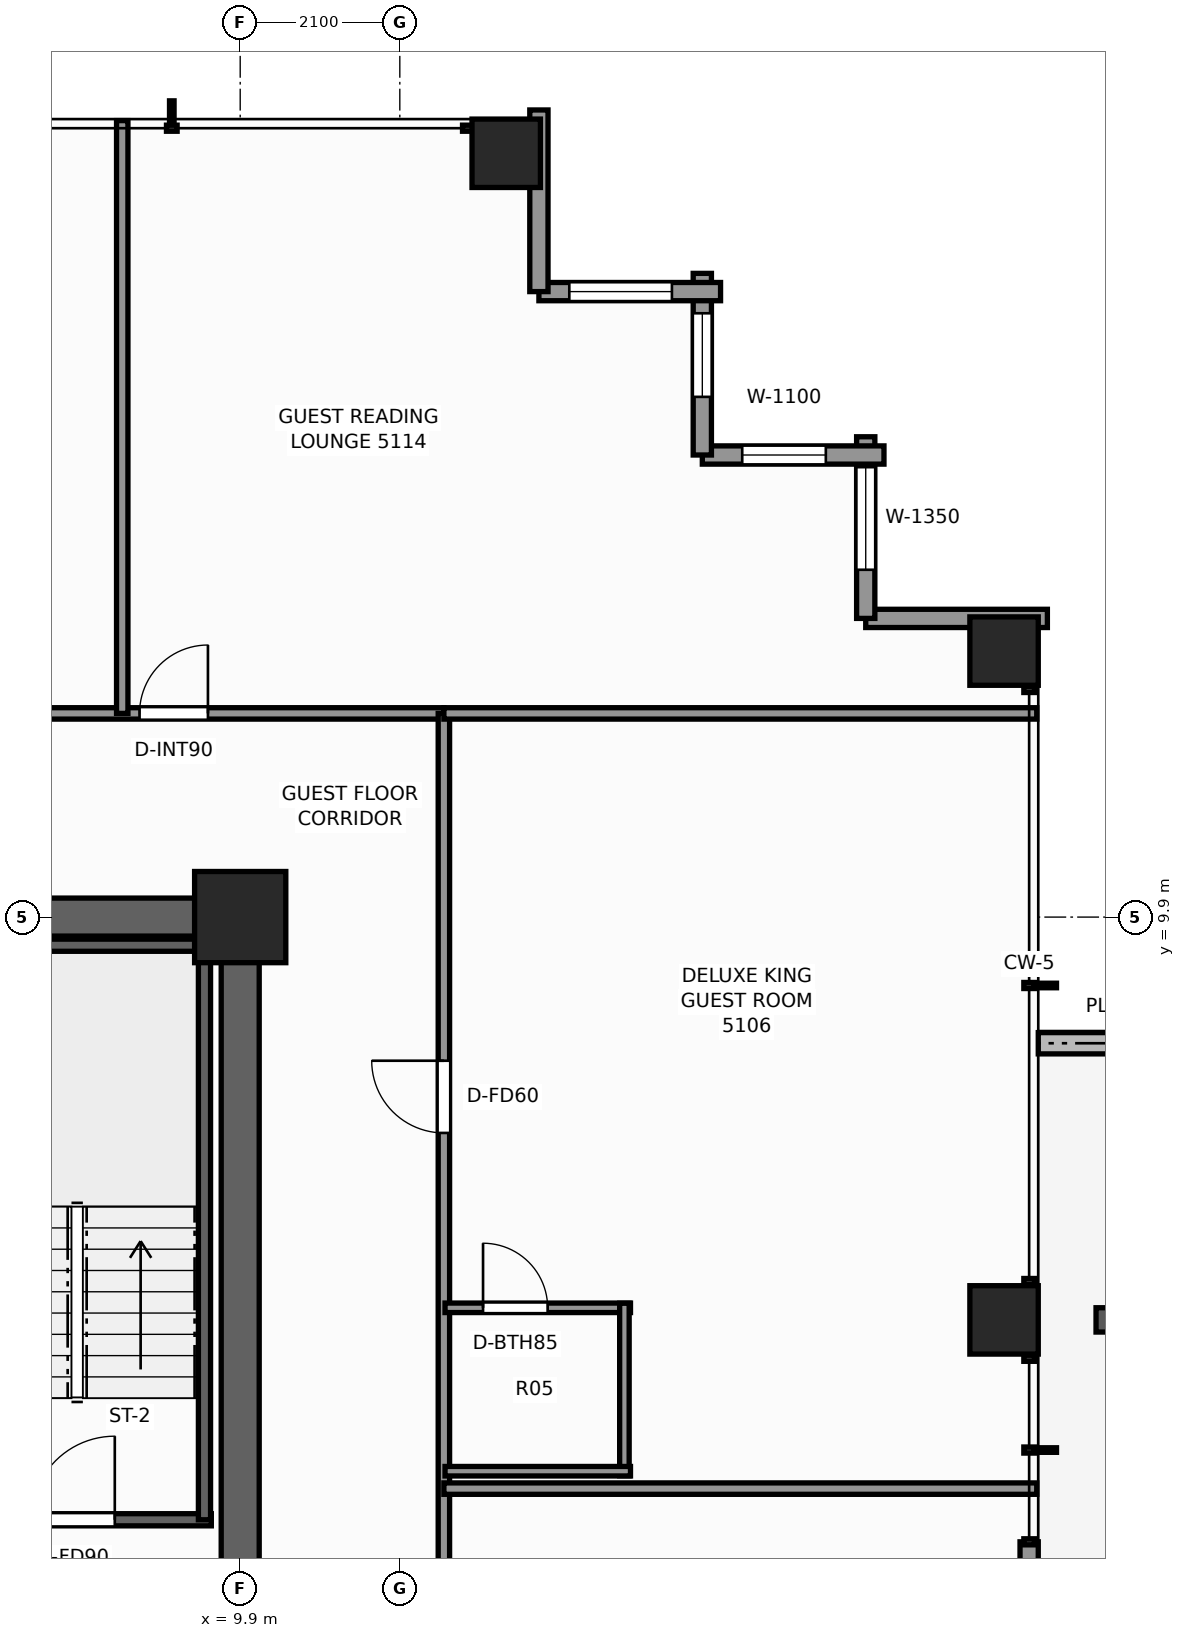
"""IFC4 building model, lengths in metres.
Left out: names, types, materials, properties, quantities, classifications, styles, units other than length and angle.
Written with IfcOpenShell. Run it as: python <this file> out.ifc"""

import sys

from ifc_helpers import new_model, si_unit, direction, frame, frame_2d, origin, origin_2d, place, context, subcontext, project, spatial, rectangle, extrude, element, fill, save


model = new_model("IFC4")
c1 = context("Model", 3, precision=1e-05, world=origin(), true_north=direction((0.0, 1.0)))
c2 = subcontext(c1, "Body", "Model", "MODEL_VIEW")
j1 = project(units=[si_unit("LENGTHUNIT", "METRE"), si_unit("PLANEANGLEUNIT", "RADIAN")], contexts=[c1])
p1 = place(None, origin())
s1 = spatial("IfcSite", under=j1, at=p1, CompositionType="ELEMENT")
p2 = place(p1, origin())
s2 = spatial("IfcBuilding", under=s1, at=p2, CompositionType="ELEMENT")
p3 = place(p2, frame((0.0, 0.0, 176.7)))
s3 = spatial("IfcBuildingStorey", under=s2, at=p3, CompositionType="ELEMENT", Elevation=176.7)
p4 = place(p3, frame((5.98, 9.9, 0.0), z_axis=(0.0, 0.0, 1.0), x_axis=(1.0, 0.0, 0.0)))
e1 = element("IfcWall", 1, at=p4, inside=s3, PredefinedType="SHEAR", context=c2, shape_type="SweptSolid", body=[
    extrude(rectangle(XDim=4.17, YDim=0.5, at=frame_2d((2.085, 0.0))), origin(), (0.0, 0.0, 1.0), 3.3),
])
p5 = place(p3, frame((9.9, -3.7, 0.0), z_axis=(0.0, 0.0, 1.0), x_axis=(0.0, 1.0, 0.0)))
e2 = element("IfcWall", 2, at=p5, inside=s3, PredefinedType="SHEAR", context=c2, shape_type="SweptSolid", body=[
    extrude(rectangle(XDim=13.35, YDim=0.5, at=frame_2d((6.675, 0.0))), origin(), (0.0, 0.0, 1.0), 3.3),
])
p6 = place(p5, frame((0.35, 0.0, 0.0)))
e3 = element("IfcOpeningElement", 3, at=p6, cuts=e2, PredefinedType="OPENING", context=c2, shape_type="SweptSolid", body=[
    extrude(rectangle(XDim=1.1, YDim=2.2, at=frame_2d((0.55, 1.1))), frame((0.0, 0.26, 0.0), z_axis=(0.0, -1.0, 0.0), x_axis=(1.0, 0.0, 0.0)), (0.0, 0.0, 1.0), 0.52),
])
p7 = place(p3, frame((9.9, 9.9, 0.0), z_axis=(0.0, 0.0, 1.0), x_axis=(1.0, 0.0, 0.0)))
e4 = element("IfcColumn", 4, at=p7, inside=s3, PredefinedType="COLUMN", context=c2, shape_type="SweptSolid", body=[
    extrude(rectangle(XDim=1.2, YDim=1.2, at=origin_2d()), origin(), (0.0, 0.0, 1.0), 3.3),
])
for number, where, z_axis, x_axis in (
    (5, (13.4, 19.95, 0.0), (0.0, 0.0, 1.0), (1.0, 0.0, 0.0)),
    (6, (19.95, 4.6, 0.0), (0.0, 0.0, 1.0), (1.0, 0.0, 0.0)),
    (7, (19.95, 13.4, 0.0), (0.0, 0.0, 1.0), (1.0, 0.0, 0.0)),
):
    element("IfcColumn", number, at=place(p3, frame(where, z_axis=z_axis, x_axis=x_axis)), inside=s3, PredefinedType="COLUMN", context=c2, shape_type="SweptSolid", body=[
        extrude(rectangle(XDim=0.9, YDim=0.9, at=origin_2d()), origin(), (0.0, 0.0, 1.0), 3.3),
    ])
p8 = place(p3, frame((22.74, 8.24, -0.04), z_axis=(0.0, 0.0, 1.0), x_axis=(-1.0, 0.0, 0.0)))
e8 = element("IfcWall", 8, at=p8, inside=s3, PredefinedType="PARAPET", context=c2, shape_type="SweptSolid", body=[
    extrude(rectangle(XDim=2.34, YDim=0.28, at=frame_2d((1.17, 0.0))), origin(), (0.0, 0.0, 1.0), 0.42),
])
p9 = place(p3, frame((20.28, 1.68, 0.0), z_axis=(0.0, 0.0, 1.0), x_axis=(0.0, -1.0, 0.0)))
e9 = element("IfcWall", 9, at=p9, inside=s3, PredefinedType="STANDARD", context=c2, shape_type="SweptSolid", body=[
    extrude(rectangle(XDim=3.36, YDim=0.24, at=frame_2d((1.68, 0.0))), origin(), (0.0, 0.0, 1.0), 3.08),
])
p10 = place(p9, frame((0.78, 0.0, 0.0)))
e10 = element("IfcOpeningElement", 10, at=p10, cuts=e9, PredefinedType="OPENING", context=c2, shape_type="SweptSolid", body=[
    extrude(rectangle(XDim=1.8, YDim=2.2, at=frame_2d((0.9, 1.1))), frame((0.0, 0.13, 0.0), z_axis=(0.0, -1.0, 0.0), x_axis=(1.0, 0.0, 0.0)), (0.0, 0.0, 1.0), 0.26),
])
p11 = place(p3, frame((18.13, 13.83, 0.0), z_axis=(0.0, 0.0, 1.0), x_axis=(1.0, 0.0, 0.0)))
e11 = element("IfcWall", 11, at=p11, inside=s3, PredefinedType="STANDARD", context=c2, shape_type="SweptSolid", body=[
    extrude(rectangle(XDim=2.39, YDim=0.24, at=frame_2d((1.195, 0.0))), origin(), (0.0, 0.0, 1.0), 2.463),
])
p12 = place(p3, frame((18.13, 16.22, 0.0), z_axis=(0.0, 0.0, 1.0), x_axis=(0.0, -1.0, 0.0)))
e12 = element("IfcWall", 12, at=p12, inside=s3, PredefinedType="STANDARD", context=c2, shape_type="SweptSolid", body=[
    extrude(rectangle(XDim=2.39, YDim=0.24, at=frame_2d((1.195, 0.0))), origin(), (0.0, 0.0, 1.0), 2.463),
])
p13 = place(p12, frame((0.4, 0.0, 0.65)))
e13 = element("IfcOpeningElement", 13, at=p13, cuts=e12, PredefinedType="OPENING", context=c2, shape_type="SweptSolid", body=[
    extrude(rectangle(XDim=1.35, YDim=1.55, at=frame_2d((0.675, 0.775))), frame((0.0, 0.13, 0.0), z_axis=(0.0, -1.0, 0.0), x_axis=(1.0, 0.0, 0.0)), (0.0, 0.0, 1.0), 0.26),
])
p14 = place(p3, frame((15.98, 15.98, 0.0), z_axis=(0.0, 0.0, 1.0), x_axis=(1.0, 0.0, 0.0)))
e14 = element("IfcWall", 14, at=p14, inside=s3, PredefinedType="STANDARD", context=c2, shape_type="SweptSolid", body=[
    extrude(rectangle(XDim=2.39, YDim=0.24, at=frame_2d((1.195, 0.0))), origin(), (0.0, 0.0, 1.0), 2.463),
])
p15 = place(p14, frame((0.525, 0.0, 0.65)))
e15 = element("IfcOpeningElement", 15, at=p15, cuts=e14, PredefinedType="OPENING", context=c2, shape_type="SweptSolid", body=[
    extrude(rectangle(XDim=1.1, YDim=1.45, at=frame_2d((0.55, 0.725))), frame((0.0, 0.13, 0.0), z_axis=(0.0, -1.0, 0.0), x_axis=(1.0, 0.0, 0.0)), (0.0, 0.0, 1.0), 0.26),
])
p16 = place(p3, frame((15.98, 18.37, 0.0), z_axis=(0.0, 0.0, 1.0), x_axis=(0.0, -1.0, 0.0)))
e16 = element("IfcWall", 16, at=p16, inside=s3, PredefinedType="STANDARD", context=c2, shape_type="SweptSolid", body=[
    extrude(rectangle(XDim=2.39, YDim=0.24, at=frame_2d((1.195, 0.0))), origin(), (0.0, 0.0, 1.0), 2.463),
])
p17 = place(p16, frame((0.525, 0.0, 0.65)))
e17 = element("IfcOpeningElement", 17, at=p17, cuts=e16, PredefinedType="OPENING", context=c2, shape_type="SweptSolid", body=[
    extrude(rectangle(XDim=1.1, YDim=1.45, at=frame_2d((0.55, 0.725))), frame((0.0, 0.13, 0.0), z_axis=(0.0, -1.0, 0.0), x_axis=(1.0, 0.0, 0.0)), (0.0, 0.0, 1.0), 0.26),
])
p18 = place(p3, frame((13.83, 18.13, 0.0), z_axis=(0.0, 0.0, 1.0), x_axis=(1.0, 0.0, 0.0)))
e18 = element("IfcWall", 18, at=p18, inside=s3, PredefinedType="STANDARD", context=c2, shape_type="SweptSolid", body=[
    extrude(rectangle(XDim=2.39, YDim=0.24, at=frame_2d((1.195, 0.0))), origin(), (0.0, 0.0, 1.0), 2.463),
])
p19 = place(p18, frame((0.4, 0.0, 0.65)))
e19 = element("IfcOpeningElement", 19, at=p19, cuts=e18, PredefinedType="OPENING", context=c2, shape_type="SweptSolid", body=[
    extrude(rectangle(XDim=1.35, YDim=1.55, at=frame_2d((0.675, 0.775))), frame((0.0, 0.13, 0.0), z_axis=(0.0, -1.0, 0.0), x_axis=(1.0, 0.0, 0.0)), (0.0, 0.0, 1.0), 0.26),
])
p20 = place(p3, frame((13.83, 20.52, 0.0), z_axis=(0.0, 0.0, 1.0), x_axis=(0.0, -1.0, 0.0)))
e20 = element("IfcWall", 20, at=p20, inside=s3, PredefinedType="STANDARD", context=c2, shape_type="SweptSolid", body=[
    extrude(rectangle(XDim=2.39, YDim=0.24, at=frame_2d((1.195, 0.0))), origin(), (0.0, 0.0, 1.0), 2.463),
])
p21 = place(p3, frame((6.0, 1.97, 0.0), z_axis=(0.0, 0.0, 1.0), x_axis=(1.0, 0.0, 0.0)))
e21 = element("IfcWall", 21, at=p21, inside=s3, PredefinedType="SHEAR", context=c2, shape_type="SweptSolid", body=[
    extrude(rectangle(XDim=3.52, YDim=0.16, at=frame_2d((1.76, 0.0))), origin(), (0.0, 0.0, 1.0), 3.3),
])
p22 = place(p21, frame((1.15, 0.0, 0.0)))
e22 = element("IfcOpeningElement", 22, at=p22, cuts=e21, PredefinedType="OPENING", context=c2, shape_type="SweptSolid", body=[
    extrude(rectangle(XDim=1.1, YDim=2.2, at=frame_2d((0.55, 1.1))), frame((0.0, 0.09, 0.0), z_axis=(0.0, -1.0, 0.0), x_axis=(1.0, 0.0, 0.0)), (0.0, 0.0, 1.0), 0.18),
])
p23 = place(p3, frame((6.0, 9.53, 0.0), z_axis=(0.0, 0.0, 1.0), x_axis=(1.0, 0.0, 0.0)))
e23 = element("IfcWall", 23, at=p23, inside=s3, PredefinedType="SHEAR", context=c2, shape_type="SweptSolid", body=[
    extrude(rectangle(XDim=3.52, YDim=0.16, at=frame_2d((1.76, 0.0))), origin(), (0.0, 0.0, 1.0), 3.3),
])
p24 = place(p3, frame((9.43, 1.97, 0.0), z_axis=(0.0, 0.0, 1.0), x_axis=(0.0, 1.0, 0.0)))
e24 = element("IfcWall", 24, at=p24, inside=s3, PredefinedType="SHEAR", context=c2, shape_type="SweptSolid", body=[
    extrude(rectangle(XDim=7.56, YDim=0.16, at=frame_2d((3.78, 0.0))), origin(), (0.0, 0.0, 1.0), 3.3),
])
p25 = place(p3, frame((-12.26, 12.58, 0.0), z_axis=(0.0, 0.0, 1.0), x_axis=(1.0, 0.0, 0.0)))
e25 = element("IfcWall", 25, at=p25, inside=s3, PredefinedType="PARTITIONING", context=c2, shape_type="SweptSolid", body=[
    extrude(rectangle(XDim=24.84, YDim=0.15, at=frame_2d((12.42, 0.0))), origin(), (0.0, 0.0, 1.0), 2.369),
])
p26 = place(p25, frame((3.323, 0.0, 0.0)))
e26 = element("IfcOpeningElement", 26, at=p26, cuts=e25, PredefinedType="OPENING", context=c2, shape_type="SweptSolid", body=[
    extrude(rectangle(XDim=0.95, YDim=2.06, at=frame_2d((0.475, 1.03))), frame((0.0, 0.085, 0.0), z_axis=(0.0, -1.0, 0.0), x_axis=(1.0, 0.0, 0.0)), (0.0, 0.0, 1.0), 0.17),
])
p27 = place(p25, frame((5.538, 0.0, 0.0)))
e27 = element("IfcOpeningElement", 27, at=p27, cuts=e25, PredefinedType="OPENING", context=c2, shape_type="SweptSolid", body=[
    extrude(rectangle(XDim=0.9, YDim=2.06, at=frame_2d((0.45, 1.03))), frame((0.0, 0.085, 0.0), z_axis=(0.0, -1.0, 0.0), x_axis=(1.0, 0.0, 0.0)), (0.0, 0.0, 1.0), 0.17),
])
p28 = place(p25, frame((10.153, 0.0, 0.0)))
e28 = element("IfcOpeningElement", 28, at=p28, cuts=e25, PredefinedType="OPENING", context=c2, shape_type="SweptSolid", body=[
    extrude(rectangle(XDim=0.95, YDim=2.06, at=frame_2d((0.475, 1.03))), frame((0.0, 0.085, 0.0), z_axis=(0.0, -1.0, 0.0), x_axis=(1.0, 0.0, 0.0)), (0.0, 0.0, 1.0), 0.17),
])
p29 = place(p25, frame((18.497, 0.0, 0.0)))
e29 = element("IfcOpeningElement", 29, at=p29, cuts=e25, PredefinedType="OPENING", context=c2, shape_type="SweptSolid", body=[
    extrude(rectangle(XDim=0.95, YDim=2.06, at=frame_2d((0.475, 1.03))), frame((0.0, 0.085, 0.0), z_axis=(0.0, -1.0, 0.0), x_axis=(1.0, 0.0, 0.0)), (0.0, 0.0, 1.0), 0.17),
])
p30 = place(p25, frame((20.836, 0.0, 0.0)))
e30 = element("IfcOpeningElement", 30, at=p30, cuts=e25, PredefinedType="OPENING", context=c2, shape_type="SweptSolid", body=[
    extrude(rectangle(XDim=0.9, YDim=2.06, at=frame_2d((0.45, 1.03))), frame((0.0, 0.085, 0.0), z_axis=(0.0, -1.0, 0.0), x_axis=(1.0, 0.0, 0.0)), (0.0, 0.0, 1.0), 0.17),
])
p31 = place(p3, frame((12.58, -12.26, 0.0), z_axis=(0.0, 0.0, 1.0), x_axis=(0.0, 1.0, 0.0)))
e31 = element("IfcWall", 31, at=p31, inside=s3, PredefinedType="PARTITIONING", context=c2, shape_type="SweptSolid", body=[
    extrude(rectangle(XDim=24.84, YDim=0.15, at=frame_2d((12.42, 0.0))), origin(), (0.0, 0.0, 1.0), 2.369),
])
p32 = place(p31, frame((4.275, 0.0, 0.0)))
e32 = element("IfcOpeningElement", 32, at=p32, cuts=e31, PredefinedType="OPENING", context=c2, shape_type="SweptSolid", body=[
    extrude(rectangle(XDim=0.9, YDim=2.06, at=frame_2d((0.45, 1.03))), frame((0.0, 0.085, 0.0), z_axis=(0.0, -1.0, 0.0), x_axis=(1.0, 0.0, 0.0)), (0.0, 0.0, 1.0), 0.17),
])
p33 = place(p31, frame((19.32, 0.0, 0.0)))
e33 = element("IfcOpeningElement", 33, at=p33, cuts=e31, PredefinedType="OPENING", context=c2, shape_type="SweptSolid", body=[
    extrude(rectangle(XDim=0.95, YDim=2.06, at=frame_2d((0.475, 1.03))), frame((0.0, 0.085, 0.0), z_axis=(0.0, -1.0, 0.0), x_axis=(1.0, 0.0, 0.0)), (0.0, 0.0, 1.0), 0.17),
])
p34 = place(p3, frame((12.58, 12.58, 0.0), z_axis=(0.0, 0.0, 1.0), x_axis=(1.0, 0.0, 0.0)))
e34 = element("IfcWall", 34, at=p34, inside=s3, PredefinedType="PARTITIONING", context=c2, shape_type="SweptSolid", body=[
    extrude(rectangle(XDim=7.8, YDim=0.15, at=frame_2d((3.9, 0.0))), origin(), (0.0, 0.0, 1.0), 2.369),
])
p35 = place(p3, frame((12.58, 2.38, 0.0), z_axis=(0.0, 0.0, 1.0), x_axis=(1.0, 0.0, 0.0)))
e35 = element("IfcWall", 35, at=p35, inside=s3, PredefinedType="PARTITIONING", context=c2, shape_type="SweptSolid", body=[
    extrude(rectangle(XDim=7.8, YDim=0.15, at=frame_2d((3.9, 0.0))), origin(), (0.0, 0.0, 1.0), 2.453),
])
p36 = place(p3, frame((12.595, 4.759, 0.0), z_axis=(0.0, 0.0, 1.0), x_axis=(1.0, 0.0, 0.0)))
e36 = element("IfcWall", 36, at=p36, inside=s3, PredefinedType="PARTITIONING", context=c2, shape_type="SweptSolid", body=[
    extrude(rectangle(XDim=2.44, YDim=0.125, at=frame_2d((1.22, 0.0))), origin(), (0.0, 0.0, 1.0), 2.369),
])
p37 = place(p36, frame((0.5, 0.0, 0.0)))
e37 = element("IfcOpeningElement", 37, at=p37, cuts=e36, PredefinedType="OPENING", context=c2, shape_type="SweptSolid", body=[
    extrude(rectangle(XDim=0.85, YDim=2.03, at=frame_2d((0.425, 1.015))), frame((0.0, 0.073, 0.0), z_axis=(0.0, -1.0, 0.0), x_axis=(1.0, 0.0, 0.0)), (0.0, 0.0, 1.0), 0.145),
])
p38 = place(p3, frame((14.955, 2.549, 0.0), z_axis=(0.0, 0.0, 1.0), x_axis=(0.0, 1.0, 0.0)))
e38 = element("IfcWall", 38, at=p38, inside=s3, PredefinedType="PARTITIONING", context=c2, shape_type="SweptSolid", body=[
    extrude(rectangle(XDim=2.27, YDim=0.125, at=frame_2d((1.135, 0.0))), origin(), (0.0, 0.0, 1.0), 2.369),
])
p39 = place(p3, frame((12.595, 2.609, 0.0), z_axis=(0.0, 0.0, 1.0), x_axis=(1.0, 0.0, 0.0)))
e39 = element("IfcWall", 39, at=p39, inside=s3, PredefinedType="PARTITIONING", context=c2, shape_type="SweptSolid", body=[
    extrude(rectangle(XDim=2.44, YDim=0.125, at=frame_2d((1.22, 0.0))), origin(), (0.0, 0.0, 1.0), 3.08),
])
p40 = place(p3, frame((8.348, 12.58, 0.0), z_axis=(0.0, 0.0, 1.0), x_axis=(0.0, 1.0, 0.0)))
e40 = element("IfcWall", 40, at=p40, inside=s3, PredefinedType="PARTITIONING", context=c2, shape_type="SweptSolid", body=[
    extrude(rectangle(XDim=7.8, YDim=0.15, at=frame_2d((3.9, 0.0))), origin(), (0.0, 0.0, 1.0), 2.453),
])
p41 = place(p13, origin())
e41 = element("IfcWindow", 41, at=p41, inside=s3, PartitioningType="SINGLE_PANEL", PredefinedType="WINDOW", context=c2, shape_type="SweptSolid", body=[
    extrude(rectangle(XDim=1.35, YDim=1.55, at=frame_2d((0.675, 0.775))), frame((0.0, 0.03, 0.0), z_axis=(0.0, -1.0, 0.0), x_axis=(1.0, 0.0, 0.0)), (0.0, 0.0, 1.0), 0.06),
])
fill(e13, e41)
p42 = place(p15, origin())
e42 = element("IfcWindow", 42, at=p42, inside=s3, PartitioningType="SINGLE_PANEL", PredefinedType="WINDOW", context=c2, shape_type="SweptSolid", body=[
    extrude(rectangle(XDim=1.1, YDim=1.45, at=frame_2d((0.55, 0.725))), frame((0.0, 0.03, 0.0), z_axis=(0.0, -1.0, 0.0), x_axis=(1.0, 0.0, 0.0)), (0.0, 0.0, 1.0), 0.06),
])
fill(e15, e42)
p43 = place(p17, origin())
e43 = element("IfcWindow", 43, at=p43, inside=s3, PartitioningType="SINGLE_PANEL", PredefinedType="WINDOW", context=c2, shape_type="SweptSolid", body=[
    extrude(rectangle(XDim=1.1, YDim=1.45, at=frame_2d((0.55, 0.725))), frame((0.0, 0.03, 0.0), z_axis=(0.0, -1.0, 0.0), x_axis=(1.0, 0.0, 0.0)), (0.0, 0.0, 1.0), 0.06),
])
fill(e17, e43)
p44 = place(p19, origin())
e44 = element("IfcWindow", 44, at=p44, inside=s3, PartitioningType="SINGLE_PANEL", PredefinedType="WINDOW", context=c2, shape_type="SweptSolid", body=[
    extrude(rectangle(XDim=1.35, YDim=1.55, at=frame_2d((0.675, 0.775))), frame((0.0, 0.03, 0.0), z_axis=(0.0, -1.0, 0.0), x_axis=(1.0, 0.0, 0.0)), (0.0, 0.0, 1.0), 0.06),
])
fill(e19, e44)
p45 = place(p22, origin())
e45 = element("IfcDoor", 45, at=p45, inside=s3, OperationType="SINGLE_SWING_RIGHT", PredefinedType="DOOR", context=c2, shape_type="SweptSolid", body=[
    extrude(rectangle(XDim=1.1, YDim=2.2, at=frame_2d((0.55, 1.1))), frame((0.0, 0.025, 0.0), z_axis=(0.0, -1.0, 0.0), x_axis=(1.0, 0.0, 0.0)), (0.0, 0.0, 1.0), 0.05),
])
fill(e22, e45)
p46 = place(p37, origin())
e46 = element("IfcDoor", 46, at=p46, inside=s3, OperationType="SINGLE_SWING_LEFT", PredefinedType="DOOR", context=c2, shape_type="SweptSolid", body=[
    extrude(rectangle(XDim=0.85, YDim=2.03, at=frame_2d((0.425, 1.015))), frame((0.0, 0.025, 0.0), z_axis=(0.0, -1.0, 0.0), x_axis=(1.0, 0.0, 0.0)), (0.0, 0.0, 1.0), 0.05),
])
fill(e37, e46)
p47 = place(p33, origin())
e47 = element("IfcDoor", 47, at=p47, inside=s3, OperationType="SINGLE_SWING_RIGHT", PredefinedType="DOOR", context=c2, shape_type="SweptSolid", body=[
    extrude(rectangle(XDim=0.95, YDim=2.06, at=frame_2d((0.475, 1.03))), frame((0.0, 0.025, 0.0), z_axis=(0.0, -1.0, 0.0), x_axis=(1.0, 0.0, 0.0)), (0.0, 0.0, 1.0), 0.05),
])
fill(e33, e47)
p48 = place(p30, origin())
e48 = element("IfcDoor", 48, at=p48, inside=s3, OperationType="SINGLE_SWING_RIGHT", PredefinedType="DOOR", context=c2, shape_type="SweptSolid", body=[
    extrude(rectangle(XDim=0.9, YDim=2.06, at=frame_2d((0.45, 1.03))), frame((0.0, 0.025, 0.0), z_axis=(0.0, -1.0, 0.0), x_axis=(1.0, 0.0, 0.0)), (0.0, 0.0, 1.0), 0.05),
])
fill(e30, e48)
save(model, sys.argv[1])
